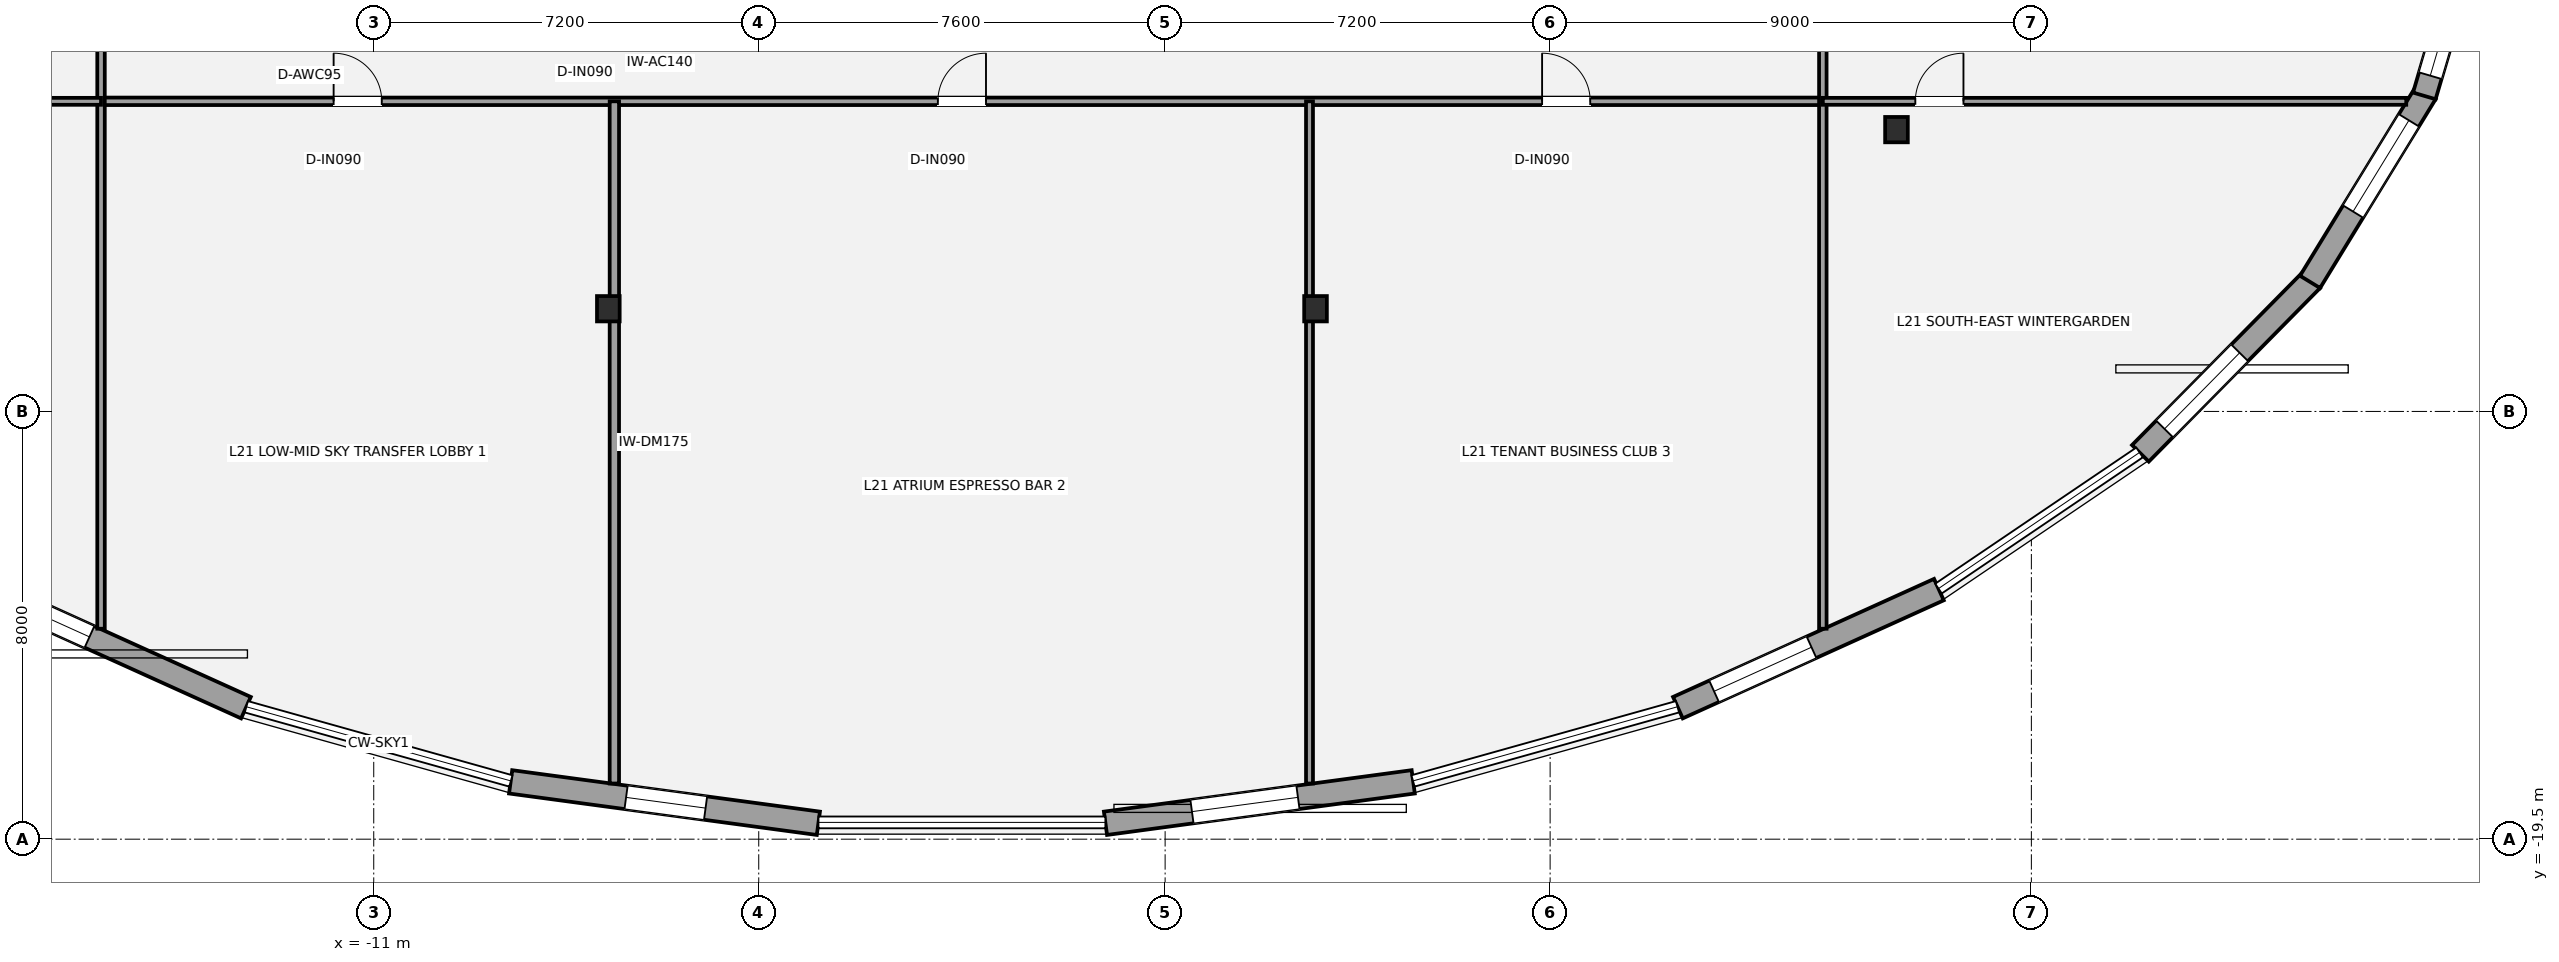
"""IFC4 building model, lengths in metres.
Left out: names, types, materials, properties, quantities, classifications, styles, units other than length and angle.
Written with IfcOpenShell. Run it as: python <this file> out.ifc"""

import sys

from ifc_helpers import new_model, si_unit, direction, frame, frame_2d, origin, origin_2d, place, context, subcontext, project, spatial, rectangle, i_section, extrude, element, fill, save


model = new_model("IFC4")
c1 = context("Model", 3, precision=1e-05, world=origin(), true_north=direction((0.0, 1.0)))
c2 = subcontext(c1, "Body", "Model", "MODEL_VIEW")
j1 = project(units=[si_unit("LENGTHUNIT", "METRE"), si_unit("PLANEANGLEUNIT", "RADIAN")], contexts=[c1])
p1 = place(None, origin())
s1 = spatial("IfcSite", under=j1, at=p1, CompositionType="ELEMENT")
p2 = place(p1, origin())
s2 = spatial("IfcBuilding", under=s1, at=p2, CompositionType="ELEMENT")
p3 = place(p2, frame((0.0, 0.0, 81.9)))
s3 = spatial("IfcBuildingStorey", under=s2, at=p3, CompositionType="ELEMENT", Elevation=81.9)
for number, where, z_axis, x_axis in (
    (1, (-6.613, -9.579, 0.0), (0.0, 0.0, 1.0), (1.0, 0.0, 0.0)),
    (2, (6.613, -9.579, 0.0), (0.0, 0.0, 1.0), (1.0, 0.0, 0.0)),
    (3, (17.477, -6.229, 0.0), (0.0, 0.0, 1.0), (1.0, 0.0, 0.0)),
):
    element("IfcColumn", number, at=place(p3, frame(where, z_axis=z_axis, x_axis=x_axis)), inside=s3, PredefinedType="COLUMN", context=c2, shape_type="SweptSolid", body=[
        extrude(i_section(OverallWidth=0.424, OverallDepth=0.474, WebThickness=0.048, FlangeThickness=0.077, at=origin_2d()), origin(), (0.0, 0.0, 1.0), 4.2),
    ])
p4 = place(p3, frame((-13.39, -17.04, 0.0), z_axis=(0.0, 0.0, 1.0), x_axis=(-0.911095050479, 0.412196323362, 0.0)))
e4 = element("IfcWall", 4, at=p4, inside=s3, PredefinedType="STANDARD", context=c2, shape_type="SweptSolid", body=[
    extrude(rectangle(XDim=5.257, YDim=0.44, at=frame_2d((2.628, 0.0))), origin(), (0.0, 0.0, 1.0), 3.228),
])
p5 = place(p4, frame((3.212, 0.0, 0.6)))
e5 = element("IfcOpeningElement", 5, at=p5, cuts=e4, PredefinedType="OPENING", context=c2, shape_type="SweptSolid", body=[
    extrude(rectangle(XDim=1.5, YDim=1.7, at=frame_2d((0.75, 0.85))), frame((0.0, 0.23, 0.0), z_axis=(0.0, -1.0, 0.0), x_axis=(1.0, 0.0, 0.0)), (0.0, 0.0, 1.0), 0.46),
])
p6 = place(p3, frame((-2.685, -19.203, 0.0), z_axis=(0.0, 0.0, 1.0), x_axis=(-0.991045582644, 0.133523979573, 0.0)))
e6 = element("IfcWall", 6, at=p6, inside=s3, PredefinedType="STANDARD", context=c2, shape_type="SweptSolid", body=[
    extrude(rectangle(XDim=5.807, YDim=0.44, at=frame_2d((2.904, 0.0))), origin(), (0.0, 0.0, 1.0), 3.228),
])
p7 = place(p6, frame((2.129, 0.0, 0.6)))
e7 = element("IfcOpeningElement", 7, at=p7, cuts=e6, PredefinedType="OPENING", context=c2, shape_type="SweptSolid", body=[
    extrude(rectangle(XDim=1.5, YDim=1.7, at=frame_2d((0.75, 0.85))), frame((0.0, 0.23, 0.0), z_axis=(0.0, -1.0, 0.0), x_axis=(1.0, 0.0, 0.0)), (0.0, 0.0, 1.0), 0.46),
])
p8 = place(p3, frame((8.44, -18.427, 0.0), z_axis=(0.0, 0.0, 1.0), x_axis=(-0.991045582644, -0.133523979573, 0.0)))
e8 = element("IfcWall", 8, at=p8, inside=s3, PredefinedType="STANDARD", context=c2, shape_type="SweptSolid", body=[
    extrude(rectangle(XDim=5.807, YDim=0.44, at=frame_2d((2.904, 0.0))), origin(), (0.0, 0.0, 1.0), 3.228),
])
p9 = place(p8, frame((2.175, 0.0, 0.6)))
e9 = element("IfcOpeningElement", 9, at=p9, cuts=e8, PredefinedType="OPENING", context=c2, shape_type="SweptSolid", body=[
    extrude(rectangle(XDim=2.0, YDim=2.1, at=frame_2d((1.0, 1.05))), frame((0.0, 0.23, 0.0), z_axis=(0.0, -1.0, 0.0), x_axis=(1.0, 0.0, 0.0)), (0.0, 0.0, 1.0), 0.46),
])
p10 = place(p3, frame((18.271, -14.832, 0.0), z_axis=(0.0, 0.0, 1.0), x_axis=(-0.911098551086, -0.412188585734, 0.0)))
e10 = element("IfcWall", 10, at=p10, inside=s3, PredefinedType="STANDARD", context=c2, shape_type="SweptSolid", body=[
    extrude(rectangle(XDim=5.357, YDim=0.44, at=frame_2d((2.679, 0.0))), origin(), (0.0, 0.0, 1.0), 3.228),
])
p11 = place(p10, frame((2.615, 0.0, 0.6)))
e11 = element("IfcOpeningElement", 11, at=p11, cuts=e10, PredefinedType="OPENING", context=c2, shape_type="SweptSolid", body=[
    extrude(rectangle(XDim=2.0, YDim=2.1, at=frame_2d((1.0, 1.05))), frame((0.0, 0.23, 0.0), z_axis=(0.0, -1.0, 0.0), x_axis=(1.0, 0.0, 0.0)), (0.0, 0.0, 1.0), 0.46),
])
p12 = place(p3, frame((25.243, -9.038, 0.0), z_axis=(0.0, 0.0, 1.0), x_axis=(-0.702407124545, -0.711775407968, 0.0)))
e12 = element("IfcWall", 12, at=p12, inside=s3, PredefinedType="STANDARD", context=c2, shape_type="SweptSolid", body=[
    extrude(rectangle(XDim=4.561, YDim=0.44, at=frame_2d((2.28, 0.0))), origin(), (0.0, 0.0, 1.0), 3.232),
])
p13 = place(p12, frame((1.919, 0.0, 0.6)))
e13 = element("IfcOpeningElement", 13, at=p13, cuts=e12, PredefinedType="OPENING", context=c2, shape_type="SweptSolid", body=[
    extrude(rectangle(XDim=2.0, YDim=2.1, at=frame_2d((1.0, 1.05))), frame((0.0, 0.23, 0.0), z_axis=(0.0, -1.0, 0.0), x_axis=(1.0, 0.0, 0.0)), (0.0, 0.0, 1.0), 0.46),
])
p14 = place(p3, frame((27.372, -5.546, 0.0), z_axis=(0.0, 0.0, 1.0), x_axis=(-0.521891226532, -0.85301204427, 0.0)))
e14 = element("IfcWall", 14, at=p14, inside=s3, PredefinedType="STANDARD", context=c2, shape_type="SweptSolid", body=[
    extrude(rectangle(XDim=4.14, YDim=0.44, at=frame_2d((2.07, 0.0))), origin(), (0.0, 0.0, 1.0), 3.228),
])
p15 = place(p14, frame((0.598, 0.0, 0.6)))
e15 = element("IfcOpeningElement", 15, at=p15, cuts=e14, PredefinedType="OPENING", context=c2, shape_type="SweptSolid", body=[
    extrude(rectangle(XDim=2.0, YDim=2.1, at=frame_2d((1.0, 1.05))), frame((0.0, 0.23, 0.0), z_axis=(0.0, -1.0, 0.0), x_axis=(1.0, 0.0, 0.0)), (0.0, 0.0, 1.0), 0.46),
])
p16 = place(p3, frame((28.45, -1.849, 0.0), z_axis=(0.0, 0.0, 1.0), x_axis=(-0.281834819638, -0.959462940629, 0.0)))
e16 = element("IfcWall", 16, at=p16, inside=s3, PredefinedType="STANDARD", context=c2, shape_type="SweptSolid", body=[
    extrude(rectangle(XDim=3.908, YDim=0.44, at=frame_2d((1.954, 0.0))), origin(), (0.0, 0.0, 1.0), 3.228),
])
p17 = place(p16, frame((1.513, 0.0, 0.6)))
e17 = element("IfcOpeningElement", 17, at=p17, cuts=e16, PredefinedType="OPENING", context=c2, shape_type="SweptSolid", body=[
    extrude(rectangle(XDim=2.0, YDim=2.1, at=frame_2d((1.0, 1.05))), frame((0.0, 0.23, 0.0), z_axis=(0.0, -1.0, 0.0), x_axis=(1.0, 0.0, 0.0)), (0.0, 0.0, 1.0), 0.46),
])
p18 = place(p3, frame((-16.1, -5.7, 0.0), z_axis=(0.0, 0.0, 1.0), x_axis=(1.0, 0.0, 0.0)))
e18 = element("IfcWall", 18, at=p18, inside=s3, PredefinedType="PARTITIONING", context=c2, shape_type="SweptSolid", body=[
    extrude(rectangle(XDim=32.2, YDim=0.14, at=frame_2d((16.1, 0.0))), origin(), (0.0, 0.0, 1.0), 3.463),
])
p19 = place(p18, frame((4.35, 0.0, 0.0)))
e19 = element("IfcOpeningElement", 19, at=p19, cuts=e18, PredefinedType="OPENING", context=c2, shape_type="SweptSolid", body=[
    extrude(rectangle(XDim=0.9, YDim=2.1, at=frame_2d((0.45, 1.05))), frame((0.0, 0.08, 0.0), z_axis=(0.0, -1.0, 0.0), x_axis=(1.0, 0.0, 0.0)), (0.0, 0.0, 1.0), 0.16),
])
p20 = place(p18, frame((15.65, 0.0, 0.0)))
e20 = element("IfcOpeningElement", 20, at=p20, cuts=e18, PredefinedType="OPENING", context=c2, shape_type="SweptSolid", body=[
    extrude(rectangle(XDim=0.9, YDim=2.1, at=frame_2d((0.45, 1.05))), frame((0.0, 0.08, 0.0), z_axis=(0.0, -1.0, 0.0), x_axis=(1.0, 0.0, 0.0)), (0.0, 0.0, 1.0), 0.16),
])
p21 = place(p18, frame((26.95, 0.0, 0.0)))
e21 = element("IfcOpeningElement", 21, at=p21, cuts=e18, PredefinedType="OPENING", context=c2, shape_type="SweptSolid", body=[
    extrude(rectangle(XDim=0.9, YDim=2.1, at=frame_2d((0.45, 1.05))), frame((0.0, 0.08, 0.0), z_axis=(0.0, -1.0, 0.0), x_axis=(1.0, 0.0, 0.0)), (0.0, 0.0, 1.0), 0.16),
])
p22 = place(p3, frame((-16.1, -15.564, 0.0), z_axis=(0.0, 0.0, 1.0), x_axis=(0.0, 1.0, 0.0)))
e22 = element("IfcWall", 22, at=p22, inside=s3, PredefinedType="PARTITIONING", context=c2, shape_type="SweptSolid", body=[
    extrude(rectangle(XDim=21.414, YDim=0.14, at=frame_2d((10.707, 0.0))), origin(), (0.0, 0.0, 1.0), 3.451),
])
p23 = place(p22, frame((12.014, 0.0, 0.0)))
e23 = element("IfcOpeningElement", 23, at=p23, cuts=e22, PredefinedType="OPENING", context=c2, shape_type="SweptSolid", body=[
    extrude(rectangle(XDim=0.9, YDim=2.1, at=frame_2d((0.45, 1.05))), frame((0.0, 0.08, 0.0), z_axis=(0.0, -1.0, 0.0), x_axis=(1.0, 0.0, 0.0)), (0.0, 0.0, 1.0), 0.16),
])
p24 = place(p22, frame((15.864, 0.0, 0.0)))
e24 = element("IfcOpeningElement", 24, at=p24, cuts=e22, PredefinedType="OPENING", context=c2, shape_type="SweptSolid", body=[
    extrude(rectangle(XDim=0.9, YDim=2.1, at=frame_2d((0.45, 1.05))), frame((0.0, 0.08, 0.0), z_axis=(0.0, -1.0, 0.0), x_axis=(1.0, 0.0, 0.0)), (0.0, 0.0, 1.0), 0.16),
])
p25 = place(p22, frame((19.039, 0.0, 0.0)))
e25 = element("IfcOpeningElement", 25, at=p25, cuts=e22, PredefinedType="OPENING", context=c2, shape_type="SweptSolid", body=[
    extrude(rectangle(XDim=0.9, YDim=2.1, at=frame_2d((0.45, 1.05))), frame((0.0, 0.08, 0.0), z_axis=(0.0, -1.0, 0.0), x_axis=(1.0, 0.0, 0.0)), (0.0, 0.0, 1.0), 0.16),
])
p26 = place(p3, frame((16.1, -15.564, 0.0), z_axis=(0.0, 0.0, 1.0), x_axis=(0.0, 1.0, 0.0)))
e26 = element("IfcWall", 26, at=p26, inside=s3, PredefinedType="PARTITIONING", context=c2, shape_type="SweptSolid", body=[
    extrude(rectangle(XDim=21.414, YDim=0.14, at=frame_2d((10.707, 0.0))), origin(), (0.0, 0.0, 1.0), 3.451),
])
p27 = place(p26, frame((13.464, 0.0, 0.0)))
e27 = element("IfcOpeningElement", 27, at=p27, cuts=e26, PredefinedType="OPENING", context=c2, shape_type="SweptSolid", body=[
    extrude(rectangle(XDim=0.9, YDim=2.1, at=frame_2d((0.45, 1.05))), frame((0.0, 0.08, 0.0), z_axis=(0.0, -1.0, 0.0), x_axis=(1.0, 0.0, 0.0)), (0.0, 0.0, 1.0), 0.16),
])
p28 = place(p26, frame((19.239, 0.0, 0.0)))
e28 = element("IfcOpeningElement", 28, at=p28, cuts=e26, PredefinedType="OPENING", context=c2, shape_type="SweptSolid", body=[
    extrude(rectangle(XDim=0.9, YDim=2.1, at=frame_2d((0.45, 1.05))), frame((0.0, 0.08, 0.0), z_axis=(0.0, -1.0, 0.0), x_axis=(1.0, 0.0, 0.0)), (0.0, 0.0, 1.0), 0.16),
])
p29 = place(p3, frame((-6.5, -18.459, 0.0), z_axis=(0.0, 0.0, 1.0), x_axis=(0.0, 1.0, 0.0)))
e29 = element("IfcWall", 29, at=p29, inside=s3, PredefinedType="PARTITIONING", context=c2, shape_type="SweptSolid", body=[
    extrude(rectangle(XDim=12.759, YDim=0.175, at=frame_2d((6.379, 0.0))), origin(), (0.0, 0.0, 1.0), 3.451),
])
p30 = place(p3, frame((6.5, -18.459, 0.0), z_axis=(0.0, 0.0, 1.0), x_axis=(0.0, 1.0, 0.0)))
e30 = element("IfcWall", 30, at=p30, inside=s3, PredefinedType="PARTITIONING", context=c2, shape_type="SweptSolid", body=[
    extrude(rectangle(XDim=12.759, YDim=0.13, at=frame_2d((6.379, 0.0))), origin(), (0.0, 0.0, 1.0), 3.451),
])
p31 = place(p3, frame((-27.01, -5.7, 0.0), z_axis=(0.0, 0.0, 1.0), x_axis=(1.0, 0.0, 0.0)))
e31 = element("IfcWall", 31, at=p31, inside=s3, PredefinedType="PARTITIONING", context=c2, shape_type="SweptSolid", body=[
    extrude(rectangle(XDim=10.91, YDim=0.13, at=frame_2d((5.455, 0.0))), origin(), (0.0, 0.0, 1.0), 3.388),
])
p32 = place(p31, frame((1.35, 0.0, 0.0)))
e32 = element("IfcOpeningElement", 32, at=p32, cuts=e31, PredefinedType="OPENING", context=c2, shape_type="SweptSolid", body=[
    extrude(rectangle(XDim=0.9, YDim=2.1, at=frame_2d((0.45, 1.05))), frame((0.0, 0.075, 0.0), z_axis=(0.0, -1.0, 0.0), x_axis=(1.0, 0.0, 0.0)), (0.0, 0.0, 1.0), 0.15),
])
p33 = place(p3, frame((16.1, -5.7, 0.0), z_axis=(0.0, 0.0, 1.0), x_axis=(1.0, 0.0, 0.0)))
e33 = element("IfcWall", 33, at=p33, inside=s3, PredefinedType="PARTITIONING", context=c2, shape_type="SweptSolid", body=[
    extrude(rectangle(XDim=10.91, YDim=0.13, at=frame_2d((5.455, 0.0))), origin(), (0.0, 0.0, 1.0), 3.388),
])
p34 = place(p33, frame((1.73, 0.0, 0.0)))
e34 = element("IfcOpeningElement", 34, at=p34, cuts=e33, PredefinedType="OPENING", context=c2, shape_type="SweptSolid", body=[
    extrude(rectangle(XDim=0.9, YDim=2.1, at=frame_2d((0.45, 1.05))), frame((0.0, 0.075, 0.0), z_axis=(0.0, -1.0, 0.0), x_axis=(1.0, 0.0, 0.0)), (0.0, 0.0, 1.0), 0.15),
])
p35 = place(p5, origin())
e35 = element("IfcWindow", 35, at=p35, inside=s3, PartitioningType="SINGLE_PANEL", PredefinedType="WINDOW", context=c2, shape_type="SweptSolid", body=[
    extrude(rectangle(XDim=1.5, YDim=1.7, at=frame_2d((0.75, 0.85))), frame((0.0, -0.01, 0.0), z_axis=(0.0, -1.0, 0.0), x_axis=(1.0, 0.0, 0.0)), (0.0, 0.0, 1.0), 0.06),
])
fill(e5, e35)
p36 = place(p7, origin())
e36 = element("IfcWindow", 36, at=p36, inside=s3, PartitioningType="SINGLE_PANEL", PredefinedType="WINDOW", context=c2, shape_type="SweptSolid", body=[
    extrude(rectangle(XDim=1.5, YDim=1.7, at=frame_2d((0.75, 0.85))), frame((0.0, -0.01, 0.0), z_axis=(0.0, -1.0, 0.0), x_axis=(1.0, 0.0, 0.0)), (0.0, 0.0, 1.0), 0.06),
])
fill(e7, e36)
p37 = place(p9, origin())
e37 = element("IfcWindow", 37, at=p37, inside=s3, PartitioningType="SINGLE_PANEL", PredefinedType="WINDOW", context=c2, shape_type="SweptSolid", body=[
    extrude(rectangle(XDim=2.0, YDim=2.1, at=frame_2d((1.0, 1.05))), frame((0.0, -0.01, 0.0), z_axis=(0.0, -1.0, 0.0), x_axis=(1.0, 0.0, 0.0)), (0.0, 0.0, 1.0), 0.06),
])
fill(e9, e37)
p38 = place(p11, origin())
e38 = element("IfcWindow", 38, at=p38, inside=s3, PartitioningType="SINGLE_PANEL", PredefinedType="WINDOW", context=c2, shape_type="SweptSolid", body=[
    extrude(rectangle(XDim=2.0, YDim=2.1, at=frame_2d((1.0, 1.05))), frame((0.0, -0.01, 0.0), z_axis=(0.0, -1.0, 0.0), x_axis=(1.0, 0.0, 0.0)), (0.0, 0.0, 1.0), 0.06),
])
fill(e11, e38)
p39 = place(p13, origin())
e39 = element("IfcWindow", 39, at=p39, inside=s3, PartitioningType="SINGLE_PANEL", PredefinedType="WINDOW", context=c2, shape_type="SweptSolid", body=[
    extrude(rectangle(XDim=2.0, YDim=2.1, at=frame_2d((1.0, 1.05))), frame((0.0, -0.01, 0.0), z_axis=(0.0, -1.0, 0.0), x_axis=(1.0, 0.0, 0.0)), (0.0, 0.0, 1.0), 0.06),
])
fill(e13, e39)
p40 = place(p15, origin())
e40 = element("IfcWindow", 40, at=p40, inside=s3, PartitioningType="SINGLE_PANEL", PredefinedType="WINDOW", context=c2, shape_type="SweptSolid", body=[
    extrude(rectangle(XDim=2.0, YDim=2.1, at=frame_2d((1.0, 1.05))), frame((0.0, -0.01, 0.0), z_axis=(0.0, -1.0, 0.0), x_axis=(1.0, 0.0, 0.0)), (0.0, 0.0, 1.0), 0.06),
])
fill(e15, e40)
p41 = place(p17, origin())
e41 = element("IfcWindow", 41, at=p41, inside=s3, PartitioningType="SINGLE_PANEL", PredefinedType="WINDOW", context=c2, shape_type="SweptSolid", body=[
    extrude(rectangle(XDim=2.0, YDim=2.1, at=frame_2d((1.0, 1.05))), frame((0.0, -0.01, 0.0), z_axis=(0.0, -1.0, 0.0), x_axis=(1.0, 0.0, 0.0)), (0.0, 0.0, 1.0), 0.06),
])
fill(e17, e41)
p42 = place(p19, origin())
e42 = element("IfcDoor", 42, at=p42, inside=s3, OperationType="SINGLE_SWING_LEFT", PredefinedType="DOOR", context=c2, shape_type="SweptSolid", body=[
    extrude(rectangle(XDim=0.9, YDim=2.1, at=frame_2d((0.45, 1.05))), frame((0.0, 0.025, 0.0), z_axis=(0.0, -1.0, 0.0), x_axis=(1.0, 0.0, 0.0)), (0.0, 0.0, 1.0), 0.05),
])
fill(e19, e42)
p43 = place(p20, origin())
e43 = element("IfcDoor", 43, at=p43, inside=s3, OperationType="SINGLE_SWING_RIGHT", PredefinedType="DOOR", context=c2, shape_type="SweptSolid", body=[
    extrude(rectangle(XDim=0.9, YDim=2.1, at=frame_2d((0.45, 1.05))), frame((0.0, 0.025, 0.0), z_axis=(0.0, -1.0, 0.0), x_axis=(1.0, 0.0, 0.0)), (0.0, 0.0, 1.0), 0.05),
])
fill(e20, e43)
p44 = place(p21, origin())
e44 = element("IfcDoor", 44, at=p44, inside=s3, OperationType="SINGLE_SWING_LEFT", PredefinedType="DOOR", context=c2, shape_type="SweptSolid", body=[
    extrude(rectangle(XDim=0.9, YDim=2.1, at=frame_2d((0.45, 1.05))), frame((0.0, 0.025, 0.0), z_axis=(0.0, -1.0, 0.0), x_axis=(1.0, 0.0, 0.0)), (0.0, 0.0, 1.0), 0.05),
])
fill(e21, e44)
p45 = place(p34, origin())
e45 = element("IfcDoor", 45, at=p45, inside=s3, OperationType="SINGLE_SWING_RIGHT", PredefinedType="DOOR", context=c2, shape_type="SweptSolid", body=[
    extrude(rectangle(XDim=0.9, YDim=2.1, at=frame_2d((0.45, 1.05))), frame((0.0, 0.025, 0.0), z_axis=(0.0, -1.0, 0.0), x_axis=(1.0, 0.0, 0.0)), (0.0, 0.0, 1.0), 0.05),
])
fill(e34, e45)
save(model, sys.argv[1])
